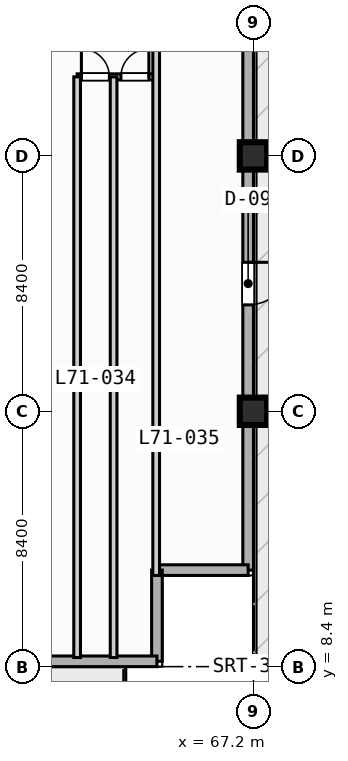
"""IFC4 building model, lengths in metres.
Left out: names, types, materials, properties, quantities, classifications, styles, units other than length and angle.
Written with IfcOpenShell. Run it as: python <this file> out.ifc"""

import sys

from ifc_helpers import new_model, si_unit, direction, frame, frame_2d, origin, origin_2d, place, context, subcontext, project, spatial, rectangle, extrude, element, fill, save


model = new_model("IFC4")
c1 = context("Model", 3, precision=1e-05, world=origin(), true_north=direction((0.0, 1.0)))
c2 = subcontext(c1, "Body", "Model", "MODEL_VIEW")
j1 = project(units=[si_unit("LENGTHUNIT", "METRE"), si_unit("PLANEANGLEUNIT", "RADIAN")], contexts=[c1])
p1 = place(None, origin())
s1 = spatial("IfcSite", under=j1, at=p1, CompositionType="ELEMENT")
p2 = place(p1, origin())
s2 = spatial("IfcBuilding", under=s1, at=p2, CompositionType="ELEMENT")
p3 = place(p2, frame((0.0, 0.0, 286.0)))
s3 = spatial("IfcBuildingStorey", under=s2, at=p3, CompositionType="ELEMENT", Elevation=286.0)
for number, where, z_axis, x_axis in (
    (1, (67.2, 16.8, 0.0), (0.0, 0.0, 1.0), (1.0, 0.0, 0.0)),
    (2, (67.2, 25.2, 0.0), (0.0, 0.0, 1.0), (1.0, 0.0, 0.0)),
):
    element("IfcColumn", number, at=place(p3, frame(where, z_axis=z_axis, x_axis=x_axis)), inside=s3, PredefinedType="COLUMN", context=c2, shape_type="SweptSolid", body=[
        extrude(rectangle(XDim=0.9, YDim=0.9, at=origin_2d()), origin(), (0.0, 0.0, 1.0), 4.4),
    ])
p4 = place(p3, frame((67.025, 30.425, 0.0), z_axis=(0.0, 0.0, 1.0), x_axis=(0.0, -1.0, 0.0)))
e3 = element("IfcWall", 3, at=p4, inside=s3, PredefinedType="STANDARD", context=c2, shape_type="SweptSolid", body=[
    extrude(rectangle(XDim=18.85, YDim=0.35, at=frame_2d((9.425, 0.0))), origin(), (0.0, 0.0, 1.0), 4.17),
])
p5 = place(p4, frame((8.725, 0.0, 0.0)))
e4 = element("IfcOpeningElement", 4, at=p5, cuts=e3, PredefinedType="OPENING", context=c2, shape_type="SweptSolid", body=[
    extrude(rectangle(XDim=1.4, YDim=2.2, at=frame_2d((0.7, 1.1))), frame((0.0, 0.185, 0.0), z_axis=(0.0, -1.0, 0.0), x_axis=(1.0, 0.0, 0.0)), (0.0, 0.0, 1.0), 0.37),
])
for number, where, z_axis, x_axis in (
    (5, (67.025, 11.575, 0.0), (0.0, 0.0, 1.0), (-1.0, 0.0, 0.0)),
    (6, (64.025, 11.575, 0.0), (0.0, 0.0, 1.0), (0.0, -1.0, 0.0)),
):
    element("IfcWall", number, at=place(p3, frame(where, z_axis=z_axis, x_axis=x_axis)), inside=s3, PredefinedType="STANDARD", context=c2, shape_type="SweptSolid", body=[
        extrude(rectangle(XDim=3.0, YDim=0.35, at=frame_2d((1.5, 0.0))), origin(), (0.0, 0.0, 1.0), 4.17),
    ])
p6 = place(p3, frame((64.025, 8.575, 0.0), z_axis=(0.0, 0.0, 1.0), x_axis=(-1.0, 0.0, 0.0)))
e7 = element("IfcWall", 7, at=p6, inside=s3, PredefinedType="STANDARD", context=c2, shape_type="SweptSolid", body=[
    extrude(rectangle(XDim=52.45, YDim=0.35, at=frame_2d((26.225, 0.0))), origin(), (0.0, 0.0, 1.0), 4.17),
])
p7 = place(p6, frame((33.925, 0.0, 0.0)))
e8 = element("IfcOpeningElement", 8, at=p7, cuts=e7, PredefinedType="OPENING", context=c2, shape_type="SweptSolid", body=[
    extrude(rectangle(XDim=1.4, YDim=2.2, at=frame_2d((0.7, 1.1))), frame((0.0, 0.185, 0.0), z_axis=(0.0, -1.0, 0.0), x_axis=(1.0, 0.0, 0.0)), (0.0, 0.0, 1.0), 0.37),
])
p8 = place(p6, frame((16.575, 0.0, 0.85)))
e9 = element("IfcOpeningElement", 9, at=p8, cuts=e7, PredefinedType="OPENING", context=c2, shape_type="SweptSolid", body=[
    extrude(rectangle(XDim=2.5, YDim=2.2, at=frame_2d((1.25, 1.1))), frame((0.0, 0.185, 0.0), z_axis=(0.0, -1.0, 0.0), x_axis=(1.0, 0.0, 0.0)), (0.0, 0.0, 1.0), 0.37),
])
p9 = place(p6, frame((8.175, 0.0, 0.85)))
e10 = element("IfcOpeningElement", 10, at=p9, cuts=e7, PredefinedType="OPENING", context=c2, shape_type="SweptSolid", body=[
    extrude(rectangle(XDim=2.5, YDim=2.2, at=frame_2d((1.25, 1.1))), frame((0.0, 0.185, 0.0), z_axis=(0.0, -1.0, 0.0), x_axis=(1.0, 0.0, 0.0)), (0.0, 0.0, 1.0), 0.37),
])
p10 = place(p3, frame((61.4, 27.8, 0.0), z_axis=(0.0, 0.0, 1.0), x_axis=(1.0, 0.0, 0.0)))
e11 = element("IfcWall", 11, at=p10, inside=s3, PredefinedType="PARTITIONING", context=c2, shape_type="SweptSolid", body=[
    extrude(rectangle(XDim=2.6, YDim=0.2, at=frame_2d((1.3, 0.0))), origin(), (0.0, 0.0, 1.0), 4.17),
])
p11 = place(p10, frame((0.14, 0.0, 0.0)))
e12 = element("IfcOpeningElement", 12, at=p11, cuts=e11, PredefinedType="OPENING", context=c2, shape_type="SweptSolid", body=[
    extrude(rectangle(XDim=0.92, YDim=2.1, at=frame_2d((0.46, 1.05))), frame((0.0, 0.11, 0.0), z_axis=(0.0, -1.0, 0.0), x_axis=(1.0, 0.0, 0.0)), (0.0, 0.0, 1.0), 0.22),
])
p12 = place(p10, frame((1.44, 0.0, 0.0)))
e13 = element("IfcOpeningElement", 13, at=p12, cuts=e11, PredefinedType="OPENING", context=c2, shape_type="SweptSolid", body=[
    extrude(rectangle(XDim=0.92, YDim=2.1, at=frame_2d((0.46, 1.05))), frame((0.0, 0.11, 0.0), z_axis=(0.0, -1.0, 0.0), x_axis=(1.0, 0.0, 0.0)), (0.0, 0.0, 1.0), 0.22),
])
p13 = place(p3, frame((61.4, 8.7, 0.0), z_axis=(0.0, 0.0, 1.0), x_axis=(0.0, 1.0, 0.0)))
e14 = element("IfcWall", 14, at=p13, inside=s3, PredefinedType="PARTITIONING", context=c2, shape_type="SweptSolid", body=[
    extrude(rectangle(XDim=19.1, YDim=0.22, at=frame_2d((9.55, 0.0))), origin(), (0.0, 0.0, 1.0), 4.17),
])
p14 = place(p3, frame((64.0, 11.4, 0.0), z_axis=(0.0, 0.0, 1.0), x_axis=(0.0, 1.0, 0.0)))
e15 = element("IfcWall", 15, at=p14, inside=s3, PredefinedType="PARTITIONING", context=c2, shape_type="SweptSolid", body=[
    extrude(rectangle(XDim=19.0, YDim=0.22, at=frame_2d((9.5, 0.0))), origin(), (0.0, 0.0, 1.0), 4.17),
])
p15 = place(p3, frame((62.6, 8.7, 0.0), z_axis=(0.0, 0.0, 1.0), x_axis=(0.0, 1.0, 0.0)))
e16 = element("IfcWall", 16, at=p15, inside=s3, PredefinedType="PARTITIONING", context=c2, shape_type="SweptSolid", body=[
    extrude(rectangle(XDim=19.1, YDim=0.22, at=frame_2d((9.55, 0.0))), origin(), (0.0, 0.0, 1.0), 4.17),
])
p16 = place(p5, origin())
e17 = element("IfcDoor", 17, at=p16, inside=s3, OperationType="SINGLE_SWING_LEFT", PredefinedType="DOOR", context=c2, shape_type="SweptSolid", body=[
    extrude(rectangle(XDim=1.4, YDim=2.2, at=frame_2d((0.7, 1.1))), frame((0.0, 0.025, 0.0), z_axis=(0.0, -1.0, 0.0), x_axis=(1.0, 0.0, 0.0)), (0.0, 0.0, 1.0), 0.05),
])
fill(e4, e17)
p17 = place(p11, origin())
e18 = element("IfcDoor", 18, at=p17, inside=s3, OperationType="SINGLE_SWING_LEFT", PredefinedType="DOOR", context=c2, shape_type="SweptSolid", body=[
    extrude(rectangle(XDim=0.92, YDim=2.1, at=frame_2d((0.46, 1.05))), frame((0.0, 0.025, 0.0), z_axis=(0.0, -1.0, 0.0), x_axis=(1.0, 0.0, 0.0)), (0.0, 0.0, 1.0), 0.05),
])
fill(e12, e18)
p18 = place(p12, origin())
e19 = element("IfcDoor", 19, at=p18, inside=s3, OperationType="SINGLE_SWING_RIGHT", PredefinedType="DOOR", context=c2, shape_type="SweptSolid", body=[
    extrude(rectangle(XDim=0.92, YDim=2.1, at=frame_2d((0.46, 1.05))), frame((0.0, 0.025, 0.0), z_axis=(0.0, -1.0, 0.0), x_axis=(1.0, 0.0, 0.0)), (0.0, 0.0, 1.0), 0.05),
])
fill(e13, e19)
save(model, sys.argv[1])
